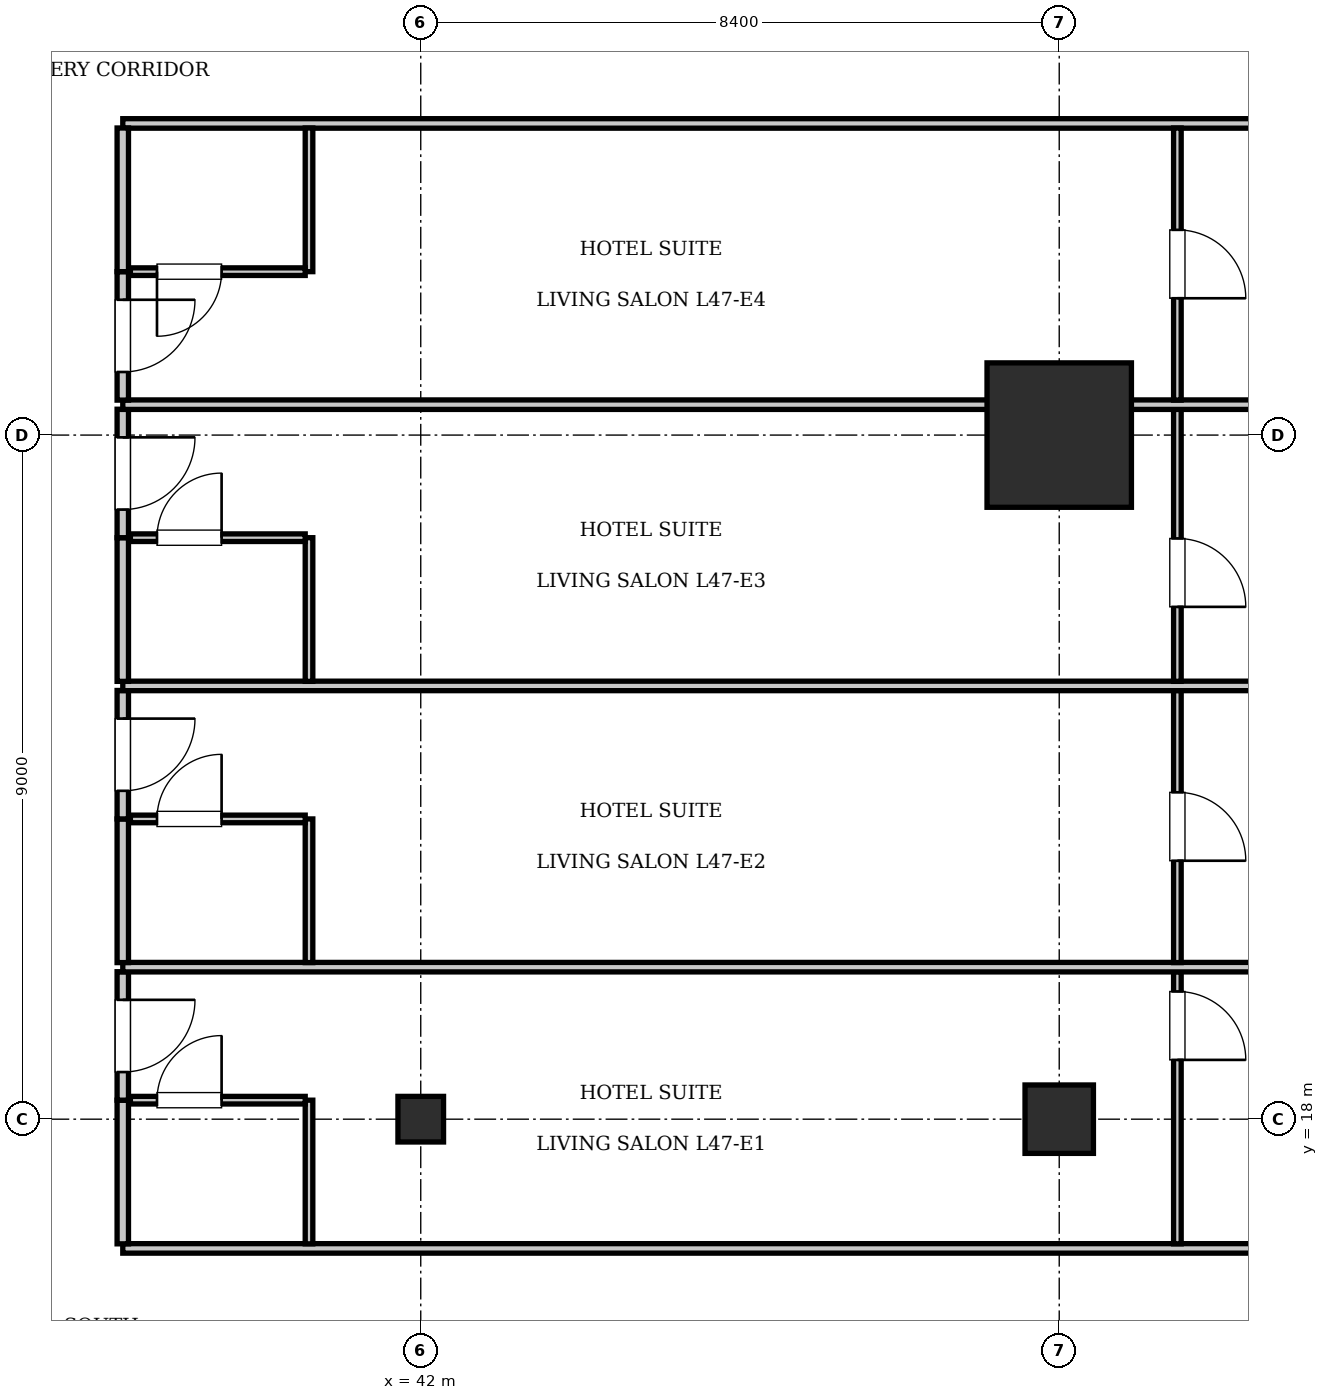
"""IFC4 building model, lengths in metres.
Left out: names, types, materials, properties, quantities, classifications, styles, units other than length and angle.
Written with IfcOpenShell. Run it as: python <this file> out.ifc"""

import sys

from ifc_helpers import new_model, si_unit, direction, frame, frame_2d, origin, origin_2d, place, context, subcontext, project, spatial, rectangle, i_section, extrude, element, fill, save


model = new_model("IFC4")
c1 = context("Model", 3, precision=1e-05, world=origin(), true_north=direction((0.0, 1.0)))
c2 = subcontext(c1, "Body", "Model", "MODEL_VIEW")
j1 = project(units=[si_unit("LENGTHUNIT", "METRE"), si_unit("PLANEANGLEUNIT", "RADIAN")], contexts=[c1])
p1 = place(None, origin())
s1 = spatial("IfcSite", under=j1, at=p1, CompositionType="ELEMENT")
p2 = place(p1, origin())
s2 = spatial("IfcBuilding", under=s1, at=p2, CompositionType="ELEMENT")
p3 = place(p2, frame((0.0, 0.0, 192.85)))
s3 = spatial("IfcBuildingStorey", under=s2, at=p3, CompositionType="ELEMENT", Elevation=192.85)
p4 = place(p3, frame((50.4, 27.0, 0.0), z_axis=(0.0, 0.0, 1.0), x_axis=(1.0, 0.0, 0.0)))
e1 = element("IfcColumn", 1, at=p4, inside=s3, PredefinedType="COLUMN", context=c2, shape_type="SweptSolid", body=[
    extrude(rectangle(XDim=1.9, YDim=1.9, at=origin_2d()), origin(), (0.0, 0.0, 1.0), 3.85),
])
p5 = place(p3, frame((50.4, 18.0, 0.0), z_axis=(0.0, 0.0, 1.0), x_axis=(1.0, 0.0, 0.0)))
e2 = element("IfcColumn", 2, at=p5, inside=s3, PredefinedType="COLUMN", context=c2, shape_type="SweptSolid", body=[
    extrude(rectangle(XDim=0.9, YDim=0.9, at=origin_2d()), origin(), (0.0, 0.0, 1.0), 3.85),
])
p6 = place(p3, frame((42.0, 18.0, 0.0), z_axis=(0.0, 0.0, 1.0), x_axis=(1.0, 0.0, 0.0)))
e3 = element("IfcColumn", 3, at=p6, inside=s3, PredefinedType="COLUMN", context=c2, shape_type="SweptSolid", body=[
    extrude(i_section(OverallWidth=0.6, OverallDepth=0.6, WebThickness=0.025, FlangeThickness=0.038, at=origin_2d()), origin(), (0.0, 0.0, 1.0), 3.85),
])
for number, where, z_axis, x_axis in (
    (4, (38.08, 16.3, 0.0), (0.0, 0.0, 1.0), (1.0, 0.0, 0.0)),
    (5, (38.08, 31.1, 0.0), (0.0, 0.0, 1.0), (1.0, 0.0, 0.0)),
):
    element("IfcWall", number, at=place(p3, frame(where, z_axis=z_axis, x_axis=x_axis)), inside=s3, PredefinedType="PARTITIONING", context=c2, shape_type="SweptSolid", body=[
        extrude(rectangle(XDim=24.32, YDim=0.125, at=frame_2d((12.16, 0.0))), origin(), (0.0, 0.0, 1.0), 3.61),
    ])
p7 = place(p3, frame((38.08, 16.36, 0.0), z_axis=(0.0, 0.0, 1.0), x_axis=(0.0, 1.0, 0.0)))
e6 = element("IfcWall", 6, at=p7, inside=s3, PredefinedType="PARTITIONING", context=c2, shape_type="SweptSolid", body=[
    extrude(rectangle(XDim=1.89, YDim=0.15, at=frame_2d((0.945, 0.0))), origin(), (0.0, 0.0, 1.0), 3.61),
])
p8 = place(p3, frame((38.08, 18.25, 0.0), z_axis=(0.0, 0.0, 1.0), x_axis=(0.0, 1.0, 0.0)))
e7 = element("IfcWall", 7, at=p8, inside=s3, PredefinedType="PARTITIONING", context=c2, shape_type="SweptSolid", body=[
    extrude(rectangle(XDim=1.69, YDim=0.15, at=frame_2d((0.845, 0.0))), origin(), (0.0, 0.0, 1.0), 3.61),
])
p9 = place(p8, frame((0.37, 0.0, 0.0)))
e8 = element("IfcOpeningElement", 8, at=p9, cuts=e7, PredefinedType="OPENING", context=c2, shape_type="SweptSolid", body=[
    extrude(rectangle(XDim=0.95, YDim=2.15, at=frame_2d((0.475, 1.075))), frame((0.0, 0.085, 0.0), z_axis=(0.0, -1.0, 0.0), x_axis=(1.0, 0.0, 0.0)), (0.0, 0.0, 1.0), 0.17),
])
p10 = place(p3, frame((40.53, 16.36, 0.0), z_axis=(0.0, 0.0, 1.0), x_axis=(0.0, 1.0, 0.0)))
e9 = element("IfcWall", 9, at=p10, inside=s3, PredefinedType="PARTITIONING", context=c2, shape_type="SweptSolid", body=[
    extrude(rectangle(XDim=1.89, YDim=0.1, at=frame_2d((0.945, 0.0))), origin(), (0.0, 0.0, 1.0), 3.61),
])
p11 = place(p3, frame((38.18, 18.25, 0.0), z_axis=(0.0, 0.0, 1.0), x_axis=(1.0, 0.0, 0.0)))
e10 = element("IfcWall", 10, at=p11, inside=s3, PredefinedType="PARTITIONING", context=c2, shape_type="SweptSolid", body=[
    extrude(rectangle(XDim=2.3, YDim=0.1, at=frame_2d((1.15, 0.0))), origin(), (0.0, 0.0, 1.0), 3.61),
])
p12 = place(p11, frame((0.35, 0.0, 0.0)))
e11 = element("IfcOpeningElement", 11, at=p12, cuts=e10, PredefinedType="OPENING", context=c2, shape_type="SweptSolid", body=[
    extrude(rectangle(XDim=0.85, YDim=2.1, at=frame_2d((0.425, 1.05))), frame((0.0, 0.06, 0.0), z_axis=(0.0, -1.0, 0.0), x_axis=(1.0, 0.0, 0.0)), (0.0, 0.0, 1.0), 0.12),
])
p13 = place(p3, frame((51.954, 16.36, 0.0), z_axis=(0.0, 0.0, 1.0), x_axis=(0.0, 1.0, 0.0)))
e12 = element("IfcWall", 12, at=p13, inside=s3, PredefinedType="PARTITIONING", context=c2, shape_type="SweptSolid", body=[
    extrude(rectangle(XDim=3.58, YDim=0.1, at=frame_2d((1.79, 0.0))), origin(), (0.0, 0.0, 1.0), 3.61),
])
p14 = place(p13, frame((2.42, 0.0, 0.0)))
e13 = element("IfcOpeningElement", 13, at=p14, cuts=e12, PredefinedType="OPENING", context=c2, shape_type="SweptSolid", body=[
    extrude(rectangle(XDim=0.9, YDim=2.1, at=frame_2d((0.45, 1.05))), frame((0.0, 0.06, 0.0), z_axis=(0.0, -1.0, 0.0), x_axis=(1.0, 0.0, 0.0)), (0.0, 0.0, 1.0), 0.12),
])
p15 = place(p3, frame((38.08, 20.0, 0.0), z_axis=(0.0, 0.0, 1.0), x_axis=(1.0, 0.0, 0.0)))
e14 = element("IfcWall", 14, at=p15, inside=s3, PredefinedType="PARTITIONING", context=c2, shape_type="SweptSolid", body=[
    extrude(rectangle(XDim=24.32, YDim=0.125, at=frame_2d((12.16, 0.0))), origin(), (0.0, 0.0, 1.0), 3.61),
])
p16 = place(p3, frame((38.08, 20.06, 0.0), z_axis=(0.0, 0.0, 1.0), x_axis=(0.0, 1.0, 0.0)))
e15 = element("IfcWall", 15, at=p16, inside=s3, PredefinedType="PARTITIONING", context=c2, shape_type="SweptSolid", body=[
    extrude(rectangle(XDim=1.89, YDim=0.15, at=frame_2d((0.945, 0.0))), origin(), (0.0, 0.0, 1.0), 3.61),
])
p17 = place(p3, frame((38.08, 21.95, 0.0), z_axis=(0.0, 0.0, 1.0), x_axis=(0.0, 1.0, 0.0)))
e16 = element("IfcWall", 16, at=p17, inside=s3, PredefinedType="PARTITIONING", context=c2, shape_type="SweptSolid", body=[
    extrude(rectangle(XDim=1.69, YDim=0.15, at=frame_2d((0.845, 0.0))), origin(), (0.0, 0.0, 1.0), 3.61),
])
p18 = place(p17, frame((0.37, 0.0, 0.0)))
e17 = element("IfcOpeningElement", 17, at=p18, cuts=e16, PredefinedType="OPENING", context=c2, shape_type="SweptSolid", body=[
    extrude(rectangle(XDim=0.95, YDim=2.15, at=frame_2d((0.475, 1.075))), frame((0.0, 0.085, 0.0), z_axis=(0.0, -1.0, 0.0), x_axis=(1.0, 0.0, 0.0)), (0.0, 0.0, 1.0), 0.17),
])
p19 = place(p3, frame((40.53, 20.06, 0.0), z_axis=(0.0, 0.0, 1.0), x_axis=(0.0, 1.0, 0.0)))
e18 = element("IfcWall", 18, at=p19, inside=s3, PredefinedType="PARTITIONING", context=c2, shape_type="SweptSolid", body=[
    extrude(rectangle(XDim=1.89, YDim=0.1, at=frame_2d((0.945, 0.0))), origin(), (0.0, 0.0, 1.0), 3.61),
])
p20 = place(p3, frame((38.18, 21.95, 0.0), z_axis=(0.0, 0.0, 1.0), x_axis=(1.0, 0.0, 0.0)))
e19 = element("IfcWall", 19, at=p20, inside=s3, PredefinedType="PARTITIONING", context=c2, shape_type="SweptSolid", body=[
    extrude(rectangle(XDim=2.3, YDim=0.1, at=frame_2d((1.15, 0.0))), origin(), (0.0, 0.0, 1.0), 3.61),
])
p21 = place(p20, frame((0.35, 0.0, 0.0)))
e20 = element("IfcOpeningElement", 20, at=p21, cuts=e19, PredefinedType="OPENING", context=c2, shape_type="SweptSolid", body=[
    extrude(rectangle(XDim=0.85, YDim=2.1, at=frame_2d((0.425, 1.05))), frame((0.0, 0.06, 0.0), z_axis=(0.0, -1.0, 0.0), x_axis=(1.0, 0.0, 0.0)), (0.0, 0.0, 1.0), 0.12),
])
p22 = place(p3, frame((51.954, 20.06, 0.0), z_axis=(0.0, 0.0, 1.0), x_axis=(0.0, 1.0, 0.0)))
e21 = element("IfcWall", 21, at=p22, inside=s3, PredefinedType="PARTITIONING", context=c2, shape_type="SweptSolid", body=[
    extrude(rectangle(XDim=3.58, YDim=0.1, at=frame_2d((1.79, 0.0))), origin(), (0.0, 0.0, 1.0), 3.61),
])
p23 = place(p22, frame((1.34, 0.0, 0.0)))
e22 = element("IfcOpeningElement", 22, at=p23, cuts=e21, PredefinedType="OPENING", context=c2, shape_type="SweptSolid", body=[
    extrude(rectangle(XDim=0.9, YDim=2.1, at=frame_2d((0.45, 1.05))), frame((0.0, 0.06, 0.0), z_axis=(0.0, -1.0, 0.0), x_axis=(1.0, 0.0, 0.0)), (0.0, 0.0, 1.0), 0.12),
])
p24 = place(p3, frame((38.08, 23.7, 0.0), z_axis=(0.0, 0.0, 1.0), x_axis=(1.0, 0.0, 0.0)))
e23 = element("IfcWall", 23, at=p24, inside=s3, PredefinedType="PARTITIONING", context=c2, shape_type="SweptSolid", body=[
    extrude(rectangle(XDim=24.32, YDim=0.125, at=frame_2d((12.16, 0.0))), origin(), (0.0, 0.0, 1.0), 3.61),
])
p25 = place(p3, frame((38.08, 23.76, 0.0), z_axis=(0.0, 0.0, 1.0), x_axis=(0.0, 1.0, 0.0)))
e24 = element("IfcWall", 24, at=p25, inside=s3, PredefinedType="PARTITIONING", context=c2, shape_type="SweptSolid", body=[
    extrude(rectangle(XDim=1.89, YDim=0.15, at=frame_2d((0.945, 0.0))), origin(), (0.0, 0.0, 1.0), 3.61),
])
p26 = place(p3, frame((38.08, 25.65, 0.0), z_axis=(0.0, 0.0, 1.0), x_axis=(0.0, 1.0, 0.0)))
e25 = element("IfcWall", 25, at=p26, inside=s3, PredefinedType="PARTITIONING", context=c2, shape_type="SweptSolid", body=[
    extrude(rectangle(XDim=1.69, YDim=0.15, at=frame_2d((0.845, 0.0))), origin(), (0.0, 0.0, 1.0), 3.61),
])
p27 = place(p26, frame((0.37, 0.0, 0.0)))
e26 = element("IfcOpeningElement", 26, at=p27, cuts=e25, PredefinedType="OPENING", context=c2, shape_type="SweptSolid", body=[
    extrude(rectangle(XDim=0.95, YDim=2.15, at=frame_2d((0.475, 1.075))), frame((0.0, 0.085, 0.0), z_axis=(0.0, -1.0, 0.0), x_axis=(1.0, 0.0, 0.0)), (0.0, 0.0, 1.0), 0.17),
])
p28 = place(p3, frame((40.53, 23.76, 0.0), z_axis=(0.0, 0.0, 1.0), x_axis=(0.0, 1.0, 0.0)))
e27 = element("IfcWall", 27, at=p28, inside=s3, PredefinedType="PARTITIONING", context=c2, shape_type="SweptSolid", body=[
    extrude(rectangle(XDim=1.89, YDim=0.1, at=frame_2d((0.945, 0.0))), origin(), (0.0, 0.0, 1.0), 3.61),
])
p29 = place(p3, frame((38.18, 25.65, 0.0), z_axis=(0.0, 0.0, 1.0), x_axis=(1.0, 0.0, 0.0)))
e28 = element("IfcWall", 28, at=p29, inside=s3, PredefinedType="PARTITIONING", context=c2, shape_type="SweptSolid", body=[
    extrude(rectangle(XDim=2.3, YDim=0.1, at=frame_2d((1.15, 0.0))), origin(), (0.0, 0.0, 1.0), 3.61),
])
p30 = place(p29, frame((0.35, 0.0, 0.0)))
e29 = element("IfcOpeningElement", 29, at=p30, cuts=e28, PredefinedType="OPENING", context=c2, shape_type="SweptSolid", body=[
    extrude(rectangle(XDim=0.85, YDim=2.1, at=frame_2d((0.425, 1.05))), frame((0.0, 0.06, 0.0), z_axis=(0.0, -1.0, 0.0), x_axis=(1.0, 0.0, 0.0)), (0.0, 0.0, 1.0), 0.12),
])
p31 = place(p3, frame((51.954, 23.76, 0.0), z_axis=(0.0, 0.0, 1.0), x_axis=(0.0, 1.0, 0.0)))
e30 = element("IfcWall", 30, at=p31, inside=s3, PredefinedType="PARTITIONING", context=c2, shape_type="SweptSolid", body=[
    extrude(rectangle(XDim=3.58, YDim=0.1, at=frame_2d((1.79, 0.0))), origin(), (0.0, 0.0, 1.0), 3.61),
])
p32 = place(p31, frame((0.98, 0.0, 0.0)))
e31 = element("IfcOpeningElement", 31, at=p32, cuts=e30, PredefinedType="OPENING", context=c2, shape_type="SweptSolid", body=[
    extrude(rectangle(XDim=0.9, YDim=2.1, at=frame_2d((0.45, 1.05))), frame((0.0, 0.06, 0.0), z_axis=(0.0, -1.0, 0.0), x_axis=(1.0, 0.0, 0.0)), (0.0, 0.0, 1.0), 0.12),
])
p33 = place(p3, frame((38.08, 27.4, 0.0), z_axis=(0.0, 0.0, 1.0), x_axis=(1.0, 0.0, 0.0)))
e32 = element("IfcWall", 32, at=p33, inside=s3, PredefinedType="PARTITIONING", context=c2, shape_type="SweptSolid", body=[
    extrude(rectangle(XDim=24.32, YDim=0.125, at=frame_2d((12.16, 0.0))), origin(), (0.0, 0.0, 1.0), 3.61),
])
p34 = place(p3, frame((38.08, 27.46, 0.0), z_axis=(0.0, 0.0, 1.0), x_axis=(0.0, 1.0, 0.0)))
e33 = element("IfcWall", 33, at=p34, inside=s3, PredefinedType="PARTITIONING", context=c2, shape_type="SweptSolid", body=[
    extrude(rectangle(XDim=1.69, YDim=0.15, at=frame_2d((0.845, 0.0))), origin(), (0.0, 0.0, 1.0), 3.61),
])
p35 = place(p34, frame((0.37, 0.0, 0.0)))
e34 = element("IfcOpeningElement", 34, at=p35, cuts=e33, PredefinedType="OPENING", context=c2, shape_type="SweptSolid", body=[
    extrude(rectangle(XDim=0.95, YDim=2.15, at=frame_2d((0.475, 1.075))), frame((0.0, 0.085, 0.0), z_axis=(0.0, -1.0, 0.0), x_axis=(1.0, 0.0, 0.0)), (0.0, 0.0, 1.0), 0.17),
])
p36 = place(p3, frame((38.08, 29.15, 0.0), z_axis=(0.0, 0.0, 1.0), x_axis=(0.0, 1.0, 0.0)))
e35 = element("IfcWall", 35, at=p36, inside=s3, PredefinedType="PARTITIONING", context=c2, shape_type="SweptSolid", body=[
    extrude(rectangle(XDim=1.89, YDim=0.15, at=frame_2d((0.945, 0.0))), origin(), (0.0, 0.0, 1.0), 3.61),
])
p37 = place(p3, frame((40.53, 29.15, 0.0), z_axis=(0.0, 0.0, 1.0), x_axis=(0.0, 1.0, 0.0)))
e36 = element("IfcWall", 36, at=p37, inside=s3, PredefinedType="PARTITIONING", context=c2, shape_type="SweptSolid", body=[
    extrude(rectangle(XDim=1.89, YDim=0.1, at=frame_2d((0.945, 0.0))), origin(), (0.0, 0.0, 1.0), 3.61),
])
p38 = place(p3, frame((38.18, 29.15, 0.0), z_axis=(0.0, 0.0, 1.0), x_axis=(1.0, 0.0, 0.0)))
e37 = element("IfcWall", 37, at=p38, inside=s3, PredefinedType="PARTITIONING", context=c2, shape_type="SweptSolid", body=[
    extrude(rectangle(XDim=2.3, YDim=0.1, at=frame_2d((1.15, 0.0))), origin(), (0.0, 0.0, 1.0), 3.61),
])
p39 = place(p38, frame((0.35, 0.0, 0.0)))
e38 = element("IfcOpeningElement", 38, at=p39, cuts=e37, PredefinedType="OPENING", context=c2, shape_type="SweptSolid", body=[
    extrude(rectangle(XDim=0.85, YDim=2.1, at=frame_2d((0.425, 1.05))), frame((0.0, 0.06, 0.0), z_axis=(0.0, -1.0, 0.0), x_axis=(1.0, 0.0, 0.0)), (0.0, 0.0, 1.0), 0.12),
])
p40 = place(p3, frame((51.954, 27.46, 0.0), z_axis=(0.0, 0.0, 1.0), x_axis=(0.0, 1.0, 0.0)))
e39 = element("IfcWall", 39, at=p40, inside=s3, PredefinedType="PARTITIONING", context=c2, shape_type="SweptSolid", body=[
    extrude(rectangle(XDim=3.58, YDim=0.1, at=frame_2d((1.79, 0.0))), origin(), (0.0, 0.0, 1.0), 3.61),
])
p41 = place(p40, frame((1.34, 0.0, 0.0)))
e40 = element("IfcOpeningElement", 40, at=p41, cuts=e39, PredefinedType="OPENING", context=c2, shape_type="SweptSolid", body=[
    extrude(rectangle(XDim=0.9, YDim=2.1, at=frame_2d((0.45, 1.05))), frame((0.0, 0.06, 0.0), z_axis=(0.0, -1.0, 0.0), x_axis=(1.0, 0.0, 0.0)), (0.0, 0.0, 1.0), 0.12),
])
p42 = place(p12, origin())
e41 = element("IfcDoor", 41, at=p42, inside=s3, OperationType="SINGLE_SWING_RIGHT", PredefinedType="DOOR", context=c2, shape_type="SweptSolid", body=[
    extrude(rectangle(XDim=0.85, YDim=2.1, at=frame_2d((0.425, 1.05))), frame((0.0, 0.025, 0.0), z_axis=(0.0, -1.0, 0.0), x_axis=(1.0, 0.0, 0.0)), (0.0, 0.0, 1.0), 0.05),
])
fill(e11, e41)
p43 = place(p9, frame((0.95, 0.0, 0.0), z_axis=(0.0, 0.0, 1.0), x_axis=(-1.0, 0.0, 0.0)))
e42 = element("IfcDoor", 42, at=p43, inside=s3, OperationType="SINGLE_SWING_LEFT", PredefinedType="DOOR", context=c2, shape_type="SweptSolid", body=[
    extrude(rectangle(XDim=0.95, YDim=2.15, at=frame_2d((0.475, 1.075))), frame((0.0, 0.025, 0.0), z_axis=(0.0, -1.0, 0.0), x_axis=(1.0, 0.0, 0.0)), (0.0, 0.0, 1.0), 0.05),
])
fill(e8, e42)
p44 = place(p14, frame((0.9, 0.0, 0.0), z_axis=(0.0, 0.0, 1.0), x_axis=(-1.0, 0.0, 0.0)))
e43 = element("IfcDoor", 43, at=p44, inside=s3, OperationType="SINGLE_SWING_RIGHT", PredefinedType="DOOR", context=c2, shape_type="SweptSolid", body=[
    extrude(rectangle(XDim=0.9, YDim=2.1, at=frame_2d((0.45, 1.05))), frame((0.0, 0.025, 0.0), z_axis=(0.0, -1.0, 0.0), x_axis=(1.0, 0.0, 0.0)), (0.0, 0.0, 1.0), 0.05),
])
fill(e13, e43)
p45 = place(p21, origin())
e44 = element("IfcDoor", 44, at=p45, inside=s3, OperationType="SINGLE_SWING_RIGHT", PredefinedType="DOOR", context=c2, shape_type="SweptSolid", body=[
    extrude(rectangle(XDim=0.85, YDim=2.1, at=frame_2d((0.425, 1.05))), frame((0.0, 0.025, 0.0), z_axis=(0.0, -1.0, 0.0), x_axis=(1.0, 0.0, 0.0)), (0.0, 0.0, 1.0), 0.05),
])
fill(e20, e44)
p46 = place(p18, frame((0.95, 0.0, 0.0), z_axis=(0.0, 0.0, 1.0), x_axis=(-1.0, 0.0, 0.0)))
e45 = element("IfcDoor", 45, at=p46, inside=s3, OperationType="SINGLE_SWING_LEFT", PredefinedType="DOOR", context=c2, shape_type="SweptSolid", body=[
    extrude(rectangle(XDim=0.95, YDim=2.15, at=frame_2d((0.475, 1.075))), frame((0.0, 0.025, 0.0), z_axis=(0.0, -1.0, 0.0), x_axis=(1.0, 0.0, 0.0)), (0.0, 0.0, 1.0), 0.05),
])
fill(e17, e45)
p47 = place(p23, frame((0.9, 0.0, 0.0), z_axis=(0.0, 0.0, 1.0), x_axis=(-1.0, 0.0, 0.0)))
e46 = element("IfcDoor", 46, at=p47, inside=s3, OperationType="SINGLE_SWING_RIGHT", PredefinedType="DOOR", context=c2, shape_type="SweptSolid", body=[
    extrude(rectangle(XDim=0.9, YDim=2.1, at=frame_2d((0.45, 1.05))), frame((0.0, 0.025, 0.0), z_axis=(0.0, -1.0, 0.0), x_axis=(1.0, 0.0, 0.0)), (0.0, 0.0, 1.0), 0.05),
])
fill(e22, e46)
p48 = place(p30, origin())
e47 = element("IfcDoor", 47, at=p48, inside=s3, OperationType="SINGLE_SWING_RIGHT", PredefinedType="DOOR", context=c2, shape_type="SweptSolid", body=[
    extrude(rectangle(XDim=0.85, YDim=2.1, at=frame_2d((0.425, 1.05))), frame((0.0, 0.025, 0.0), z_axis=(0.0, -1.0, 0.0), x_axis=(1.0, 0.0, 0.0)), (0.0, 0.0, 1.0), 0.05),
])
fill(e29, e47)
p49 = place(p27, frame((0.95, 0.0, 0.0), z_axis=(0.0, 0.0, 1.0), x_axis=(-1.0, 0.0, 0.0)))
e48 = element("IfcDoor", 48, at=p49, inside=s3, OperationType="SINGLE_SWING_LEFT", PredefinedType="DOOR", context=c2, shape_type="SweptSolid", body=[
    extrude(rectangle(XDim=0.95, YDim=2.15, at=frame_2d((0.475, 1.075))), frame((0.0, 0.025, 0.0), z_axis=(0.0, -1.0, 0.0), x_axis=(1.0, 0.0, 0.0)), (0.0, 0.0, 1.0), 0.05),
])
fill(e26, e48)
p50 = place(p32, frame((0.9, 0.0, 0.0), z_axis=(0.0, 0.0, 1.0), x_axis=(-1.0, 0.0, 0.0)))
e49 = element("IfcDoor", 49, at=p50, inside=s3, OperationType="SINGLE_SWING_RIGHT", PredefinedType="DOOR", context=c2, shape_type="SweptSolid", body=[
    extrude(rectangle(XDim=0.9, YDim=2.1, at=frame_2d((0.45, 1.05))), frame((0.0, 0.025, 0.0), z_axis=(0.0, -1.0, 0.0), x_axis=(1.0, 0.0, 0.0)), (0.0, 0.0, 1.0), 0.05),
])
fill(e31, e49)
p51 = place(p39, frame((0.85, 0.0, 0.0), z_axis=(0.0, 0.0, 1.0), x_axis=(-1.0, 0.0, 0.0)))
e50 = element("IfcDoor", 50, at=p51, inside=s3, OperationType="SINGLE_SWING_RIGHT", PredefinedType="DOOR", context=c2, shape_type="SweptSolid", body=[
    extrude(rectangle(XDim=0.85, YDim=2.1, at=frame_2d((0.425, 1.05))), frame((0.0, 0.025, 0.0), z_axis=(0.0, -1.0, 0.0), x_axis=(1.0, 0.0, 0.0)), (0.0, 0.0, 1.0), 0.05),
])
fill(e38, e50)
p52 = place(p35, frame((0.95, 0.0, 0.0), z_axis=(0.0, 0.0, 1.0), x_axis=(-1.0, 0.0, 0.0)))
e51 = element("IfcDoor", 51, at=p52, inside=s3, OperationType="SINGLE_SWING_LEFT", PredefinedType="DOOR", context=c2, shape_type="SweptSolid", body=[
    extrude(rectangle(XDim=0.95, YDim=2.15, at=frame_2d((0.475, 1.075))), frame((0.0, 0.025, 0.0), z_axis=(0.0, -1.0, 0.0), x_axis=(1.0, 0.0, 0.0)), (0.0, 0.0, 1.0), 0.05),
])
fill(e34, e51)
p53 = place(p41, frame((0.9, 0.0, 0.0), z_axis=(0.0, 0.0, 1.0), x_axis=(-1.0, 0.0, 0.0)))
e52 = element("IfcDoor", 52, at=p53, inside=s3, OperationType="SINGLE_SWING_RIGHT", PredefinedType="DOOR", context=c2, shape_type="SweptSolid", body=[
    extrude(rectangle(XDim=0.9, YDim=2.1, at=frame_2d((0.45, 1.05))), frame((0.0, 0.025, 0.0), z_axis=(0.0, -1.0, 0.0), x_axis=(1.0, 0.0, 0.0)), (0.0, 0.0, 1.0), 0.05),
])
fill(e40, e52)
save(model, sys.argv[1])
